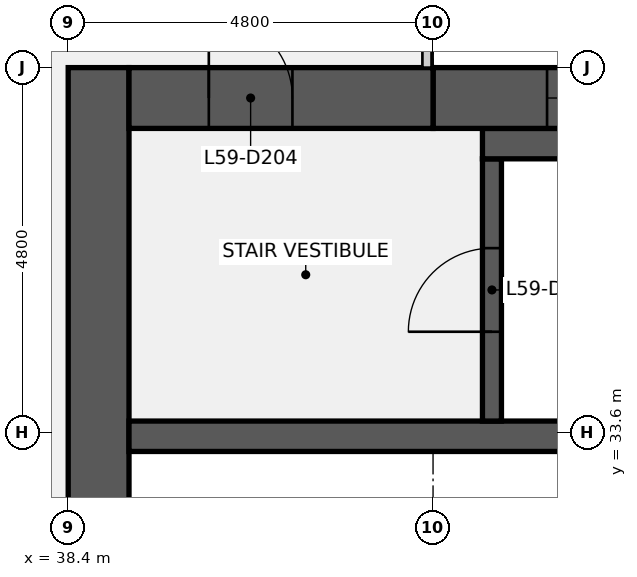
"""IFC4 building model, lengths in metres.
Left out: names, types, materials, properties, quantities, classifications, styles, units other than length and angle.
Written with IfcOpenShell. Run it as: python <this file> out.ifc"""

import sys

from ifc_helpers import new_model, si_unit, direction, frame, frame_2d, origin, place, context, subcontext, project, spatial, rectangle, extrude, element, fill, save


model = new_model("IFC4")
c1 = context("Model", 3, precision=1e-05, world=origin(), true_north=direction((0.0, 1.0)))
c2 = subcontext(c1, "Body", "Model", "MODEL_VIEW")
j1 = project(units=[si_unit("LENGTHUNIT", "METRE"), si_unit("PLANEANGLEUNIT", "RADIAN")], contexts=[c1])
p1 = place(None, origin())
s1 = spatial("IfcSite", under=j1, at=p1, CompositionType="ELEMENT")
p2 = place(p1, origin())
s2 = spatial("IfcBuilding", under=s1, at=p2, CompositionType="ELEMENT")
p3 = place(p2, frame((0.0, 0.0, 265.2)))
s3 = spatial("IfcBuildingStorey", under=s2, at=p3, CompositionType="ELEMENT", Elevation=265.2)
p4 = place(p3, frame((38.8, 9.6, 0.0), z_axis=(0.0, 0.0, 1.0), x_axis=(0.0, 1.0, 0.0)))
e1 = element("IfcWall", 1, at=p4, inside=s3, PredefinedType="SHEAR", context=c2, shape_type="SweptSolid", body=[
    extrude(rectangle(XDim=28.8, YDim=0.8, at=frame_2d((14.4, 0.0))), origin(), (0.0, 0.0, 1.0), 4.1),
])
p5 = place(p4, frame((8.7, 0.0, 0.0)))
e2 = element("IfcOpeningElement", 2, at=p5, cuts=e1, PredefinedType="OPENING", context=c2, shape_type="SweptSolid", body=[
    extrude(rectangle(XDim=1.8, YDim=2.1, at=frame_2d((0.9, 1.05))), frame((0.0, 0.41, 0.0), z_axis=(0.0, -1.0, 0.0), x_axis=(1.0, 0.0, 0.0)), (0.0, 0.0, 1.0), 0.82),
])
p6 = place(p4, frame((18.3, 0.0, 0.0)))
e3 = element("IfcOpeningElement", 3, at=p6, cuts=e1, PredefinedType="OPENING", context=c2, shape_type="SweptSolid", body=[
    extrude(rectangle(XDim=1.8, YDim=2.1, at=frame_2d((0.9, 1.05))), frame((0.0, 0.41, 0.0), z_axis=(0.0, -1.0, 0.0), x_axis=(1.0, 0.0, 0.0)), (0.0, 0.0, 1.0), 0.82),
])
p7 = place(p3, frame((39.2, 33.55, 0.0), z_axis=(0.0, 0.0, 1.0), x_axis=(1.0, 0.0, 0.0)))
e4 = element("IfcWall", 4, at=p7, inside=s3, PredefinedType="SHEAR", context=c2, shape_type="SweptSolid", body=[
    extrude(rectangle(XDim=17.6, YDim=0.4, at=frame_2d((8.8, 0.0))), origin(), (0.0, 0.0, 1.0), 4.1),
])
p8 = place(p3, frame((43.975, 33.75, 0.0), z_axis=(0.0, 0.0, 1.0), x_axis=(0.0, 1.0, 0.0)))
e5 = element("IfcWall", 5, at=p8, inside=s3, PredefinedType="SHEAR", context=c2, shape_type="SweptSolid", body=[
    extrude(rectangle(XDim=3.45, YDim=0.25, at=frame_2d((1.725, 0.0))), origin(), (0.0, 0.0, 1.0), 4.1),
])
p9 = place(p8, frame((1.175, 0.0, 0.0)))
e6 = element("IfcOpeningElement", 6, at=p9, cuts=e5, PredefinedType="OPENING", context=c2, shape_type="SweptSolid", body=[
    extrude(rectangle(XDim=1.1, YDim=2.1, at=frame_2d((0.55, 1.05))), frame((0.0, 0.135, 0.0), z_axis=(0.0, -1.0, 0.0), x_axis=(1.0, 0.0, 0.0)), (0.0, 0.0, 1.0), 0.27),
])
p10 = place(p3, frame((43.85, 37.4, 0.0), z_axis=(0.0, 0.0, 1.0), x_axis=(1.0, 0.0, 0.0)))
e7 = element("IfcWall", 7, at=p10, inside=s3, PredefinedType="SHEAR", context=c2, shape_type="SweptSolid", body=[
    extrude(rectangle(XDim=7.5, YDim=0.4, at=frame_2d((3.75, 0.0))), origin(), (0.0, 0.0, 1.0), 4.1),
])
p11 = place(p3, frame((43.2, 38.0, 0.0), z_axis=(0.0, 0.0, 1.0), x_axis=(1.0, 0.0, 0.0)))
e8 = element("IfcWall", 8, at=p11, inside=s3, PredefinedType="SHEAR", context=c2, shape_type="SweptSolid", body=[
    extrude(rectangle(XDim=13.6, YDim=0.8, at=frame_2d((6.8, 0.0))), origin(), (0.0, 0.0, 1.0), 4.1),
])
p12 = place(p11, frame((6.3, 0.0, 0.9)))
e9 = element("IfcOpeningElement", 9, at=p12, cuts=e8, PredefinedType="OPENING", context=c2, shape_type="SweptSolid", body=[
    extrude(rectangle(XDim=1.8, YDim=1.5, at=frame_2d((0.9, 0.75))), frame((0.0, 0.41, 0.0), z_axis=(0.0, -1.0, 0.0), x_axis=(1.0, 0.0, 0.0)), (0.0, 0.0, 1.0), 0.82),
])
p13 = place(p11, frame((1.5, 0.0, 0.9)))
e10 = element("IfcOpeningElement", 10, at=p13, cuts=e8, PredefinedType="OPENING", context=c2, shape_type="SweptSolid", body=[
    extrude(rectangle(XDim=1.8, YDim=1.5, at=frame_2d((0.9, 0.75))), frame((0.0, 0.41, 0.0), z_axis=(0.0, -1.0, 0.0), x_axis=(1.0, 0.0, 0.0)), (0.0, 0.0, 1.0), 0.82),
])
p14 = place(p3, frame((39.2, 38.0, 0.0), z_axis=(0.0, 0.0, 1.0), x_axis=(1.0, 0.0, 0.0)))
e11 = element("IfcWall", 11, at=p14, inside=s3, PredefinedType="SHEAR", context=c2, shape_type="SweptSolid", body=[
    extrude(rectangle(XDim=4.0, YDim=0.8, at=frame_2d((2.0, 0.0))), origin(), (0.0, 0.0, 1.0), 4.1),
])
p15 = place(p14, frame((1.05, 0.0, 0.0)))
e12 = element("IfcOpeningElement", 12, at=p15, cuts=e11, PredefinedType="OPENING", context=c2, shape_type="SweptSolid", body=[
    extrude(rectangle(XDim=1.1, YDim=2.1, at=frame_2d((0.55, 1.05))), frame((0.0, 0.41, 0.0), z_axis=(0.0, -1.0, 0.0), x_axis=(1.0, 0.0, 0.0)), (0.0, 0.0, 1.0), 0.82),
])
p16 = place(p9, origin())
e13 = element("IfcDoor", 13, at=p16, inside=s3, OperationType="SINGLE_SWING_LEFT", PredefinedType="DOOR", context=c2, shape_type="SweptSolid", body=[
    extrude(rectangle(XDim=1.1, YDim=2.1, at=frame_2d((0.55, 1.05))), frame((0.0, 0.025, 0.0), z_axis=(0.0, -1.0, 0.0), x_axis=(1.0, 0.0, 0.0)), (0.0, 0.0, 1.0), 0.05),
])
fill(e6, e13)
p17 = place(p15, origin())
e14 = element("IfcDoor", 14, at=p17, inside=s3, OperationType="SINGLE_SWING_LEFT", PredefinedType="DOOR", context=c2, shape_type="SweptSolid", body=[
    extrude(rectangle(XDim=1.1, YDim=2.1, at=frame_2d((0.55, 1.05))), frame((0.0, 0.025, 0.0), z_axis=(0.0, -1.0, 0.0), x_axis=(1.0, 0.0, 0.0)), (0.0, 0.0, 1.0), 0.05),
])
fill(e12, e14)
p18 = place(p13, origin())
e15 = element("IfcWindow", 15, at=p18, inside=s3, PartitioningType="SINGLE_PANEL", PredefinedType="WINDOW", context=c2, shape_type="SweptSolid", body=[
    extrude(rectangle(XDim=1.8, YDim=1.5, at=frame_2d((0.9, 0.75))), frame((0.0, 0.03, 0.0), z_axis=(0.0, -1.0, 0.0), x_axis=(1.0, 0.0, 0.0)), (0.0, 0.0, 1.0), 0.06),
])
fill(e10, e15)
save(model, sys.argv[1])
